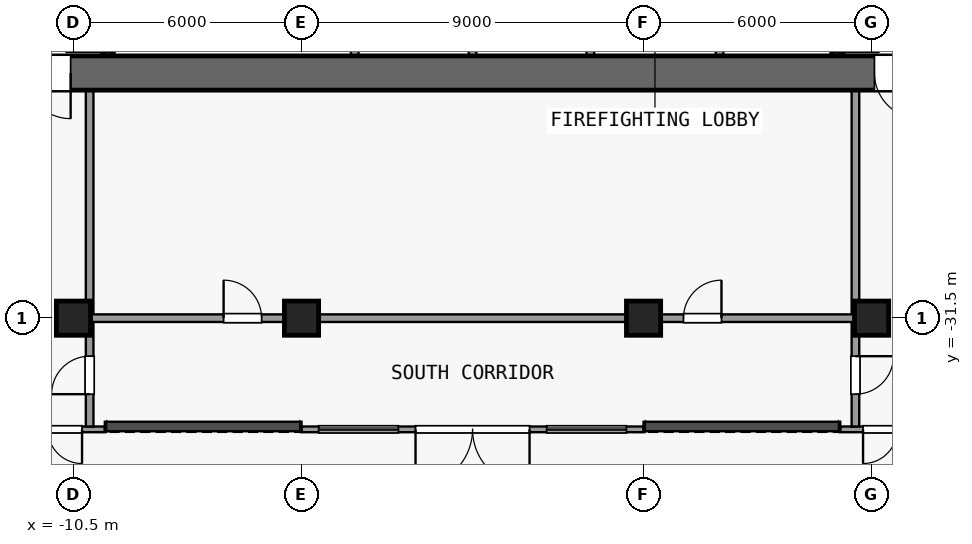
"""IFC4 building model, lengths in metres.
Left out: names, types, materials, properties, quantities, classifications, styles, units other than length and angle.
Written with IfcOpenShell. Run it as: python <this file> out.ifc"""

import sys

from ifc_helpers import new_model, si_unit, direction, frame, frame_2d, origin, origin_2d, place, context, subcontext, project, spatial, rectangle, extrude, element, fill, save


model = new_model("IFC4")
c1 = context("Model", 3, precision=1e-05, world=origin(), true_north=direction((0.0, 1.0)))
c2 = subcontext(c1, "Body", "Model", "MODEL_VIEW")
j1 = project(units=[si_unit("LENGTHUNIT", "METRE"), si_unit("PLANEANGLEUNIT", "RADIAN")], contexts=[c1])
p1 = place(None, origin())
s1 = spatial("IfcSite", under=j1, at=p1, CompositionType="ELEMENT")
p2 = place(p1, origin())
s2 = spatial("IfcBuilding", under=s1, at=p2, CompositionType="ELEMENT")
p3 = place(p2, origin())
s3 = spatial("IfcBuildingStorey", under=s2, at=p3, CompositionType="ELEMENT", Elevation=0.0)
for number, where, z_axis, x_axis in (
    (1, (-10.5, -31.5, 0.0), (0.0, 0.0, 1.0), (1.0, 0.0, 0.0)),
    (2, (-4.5, -31.5, 0.0), (0.0, 0.0, 1.0), (1.0, 0.0, 0.0)),
    (3, (4.5, -31.5, 0.0), (0.0, 0.0, 1.0), (1.0, 0.0, 0.0)),
    (4, (10.5, -31.5, 0.0), (0.0, 0.0, 1.0), (1.0, 0.0, 0.0)),
):
    element("IfcColumn", number, at=place(p3, frame(where, z_axis=z_axis, x_axis=x_axis)), inside=s3, PredefinedType="COLUMN", context=c2, shape_type="SweptSolid", body=[
        extrude(rectangle(XDim=0.9, YDim=0.9, at=origin_2d()), origin(), (0.0, 0.0, 1.0), 8.0),
    ])
p4 = place(p3, frame((13.5, -25.05, 0.0), z_axis=(0.0, 0.0, 1.0), x_axis=(-1.0, 0.0, 0.0)))
e5 = element("IfcWall", 5, at=p4, inside=s3, PredefinedType="SHEAR", context=c2, shape_type="SweptSolid", body=[
    extrude(rectangle(XDim=27.0, YDim=0.9, at=frame_2d((13.5, 0.0))), origin(), (0.0, 0.0, 1.0), 7.65),
])
p5 = place(p4, frame((24.075, 0.0, 0.0)))
e6 = element("IfcOpeningElement", 6, at=p5, cuts=e5, PredefinedType="OPENING", context=c2, shape_type="SweptSolid", body=[
    extrude(rectangle(XDim=1.2, YDim=2.1, at=frame_2d((0.6, 1.05))), frame((0.0, 0.46, 0.0), z_axis=(0.0, -1.0, 0.0), x_axis=(1.0, 0.0, 0.0)), (0.0, 0.0, 1.0), 0.92),
])
p6 = place(p4, frame((1.725, 0.0, 0.0)))
e7 = element("IfcOpeningElement", 7, at=p6, cuts=e5, PredefinedType="OPENING", context=c2, shape_type="SweptSolid", body=[
    extrude(rectangle(XDim=1.2, YDim=2.1, at=frame_2d((0.6, 1.05))), frame((0.0, 0.46, 0.0), z_axis=(0.0, -1.0, 0.0), x_axis=(1.0, 0.0, 0.0)), (0.0, 0.0, 1.0), 0.92),
])
p7 = place(p3, frame((-9.6, -24.6, 0.0), z_axis=(0.0, 0.0, 1.0), x_axis=(0.0, 1.0, 0.0)))
e8 = element("IfcWall", 8, at=p7, inside=s3, PredefinedType="SHEAR", context=c2, shape_type="SweptSolid", body=[
    extrude(rectangle(XDim=7.7, YDim=0.3, at=frame_2d((3.85, 0.0))), origin(), (0.0, 0.0, 1.0), 7.65),
])
p8 = place(p7, frame((0.1, 0.0, 0.0)))
e9 = element("IfcOpeningElement", 9, at=p8, cuts=e8, PredefinedType="OPENING", context=c2, shape_type="SweptSolid", body=[
    extrude(rectangle(XDim=1.1, YDim=2.1, at=frame_2d((0.55, 1.05))), frame((0.0, 0.16, 0.0), z_axis=(0.0, -1.0, 0.0), x_axis=(1.0, 0.0, 0.0)), (0.0, 0.0, 1.0), 0.32),
])
p9 = place(p3, frame((-3.1, -22.55, 0.0), z_axis=(0.0, 0.0, 1.0), x_axis=(0.0, -1.0, 0.0)))
e10 = element("IfcWall", 10, at=p9, inside=s3, PredefinedType="PARTITIONING", context=c2, shape_type="SweptSolid", body=[
    extrude(rectangle(XDim=2.05, YDim=0.2, at=frame_2d((1.025, 0.0))), origin(), (0.0, 0.0, 1.0), 7.65),
])
p10 = place(p9, frame((0.5, 0.0, 0.0)))
e11 = element("IfcOpeningElement", 11, at=p10, cuts=e10, PredefinedType="OPENING", context=c2, shape_type="SweptSolid", body=[
    extrude(rectangle(XDim=0.9, YDim=2.1, at=frame_2d((0.45, 1.05))), frame((0.0, 0.11, 0.0), z_axis=(0.0, -1.0, 0.0), x_axis=(1.0, 0.0, 0.0)), (0.0, 0.0, 1.0), 0.22),
])
p11 = place(p3, frame((0.0, -24.6, 0.0), z_axis=(0.0, 0.0, 1.0), x_axis=(0.0, 1.0, 0.0)))
e12 = element("IfcWall", 12, at=p11, inside=s3, PredefinedType="PARTITIONING", context=c2, shape_type="SweptSolid", body=[
    extrude(rectangle(XDim=2.05, YDim=0.2, at=frame_2d((1.025, 0.0))), origin(), (0.0, 0.0, 1.0), 7.65),
])
p12 = place(p3, frame((3.1, -24.6, 0.0), z_axis=(0.0, 0.0, 1.0), x_axis=(0.0, 1.0, 0.0)))
e13 = element("IfcWall", 13, at=p12, inside=s3, PredefinedType="PARTITIONING", context=c2, shape_type="SweptSolid", body=[
    extrude(rectangle(XDim=2.05, YDim=0.2, at=frame_2d((1.025, 0.0))), origin(), (0.0, 0.0, 1.0), 7.65),
])
p13 = place(p12, frame((0.65, 0.0, 0.0)))
e14 = element("IfcOpeningElement", 14, at=p13, cuts=e13, PredefinedType="OPENING", context=c2, shape_type="SweptSolid", body=[
    extrude(rectangle(XDim=0.9, YDim=2.1, at=frame_2d((0.45, 1.05))), frame((0.0, 0.11, 0.0), z_axis=(0.0, -1.0, 0.0), x_axis=(1.0, 0.0, 0.0)), (0.0, 0.0, 1.0), 0.22),
])
p14 = place(p3, frame((6.5, -22.55, 0.0), z_axis=(0.0, 0.0, 1.0), x_axis=(0.0, -1.0, 0.0)))
e15 = element("IfcWall", 15, at=p14, inside=s3, PredefinedType="PARTITIONING", context=c2, shape_type="SweptSolid", body=[
    extrude(rectangle(XDim=2.05, YDim=0.2, at=frame_2d((1.025, 0.0))), origin(), (0.0, 0.0, 1.0), 7.65),
])
p15 = place(p14, frame((0.35, 0.0, 0.0)))
e16 = element("IfcOpeningElement", 16, at=p15, cuts=e15, PredefinedType="OPENING", context=c2, shape_type="SweptSolid", body=[
    extrude(rectangle(XDim=1.2, YDim=2.1, at=frame_2d((0.6, 1.05))), frame((0.0, 0.11, 0.0), z_axis=(0.0, -1.0, 0.0), x_axis=(1.0, 0.0, 0.0)), (0.0, 0.0, 1.0), 0.22),
])
p16 = place(p3, frame((9.6, -16.9, 0.0), z_axis=(0.0, 0.0, 1.0), x_axis=(0.0, -1.0, 0.0)))
e17 = element("IfcWall", 17, at=p16, inside=s3, PredefinedType="SHEAR", context=c2, shape_type="SweptSolid", body=[
    extrude(rectangle(XDim=7.7, YDim=0.3, at=frame_2d((3.85, 0.0))), origin(), (0.0, 0.0, 1.0), 7.65),
])
p17 = place(p16, frame((6.5, 0.0, 0.0)))
e18 = element("IfcOpeningElement", 18, at=p17, cuts=e17, PredefinedType="OPENING", context=c2, shape_type="SweptSolid", body=[
    extrude(rectangle(XDim=1.1, YDim=2.1, at=frame_2d((0.55, 1.05))), frame((0.0, 0.16, 0.0), z_axis=(0.0, -1.0, 0.0), x_axis=(1.0, 0.0, 0.0)), (0.0, 0.0, 1.0), 0.32),
])
p18 = place(p3, frame((-10.075, -34.35, 0.0), z_axis=(0.0, 0.0, 1.0), x_axis=(0.0, 1.0, 0.0)))
e19 = element("IfcWall", 19, at=p18, inside=s3, PredefinedType="PARTITIONING", context=c2, shape_type="SweptSolid", body=[
    extrude(rectangle(XDim=8.85, YDim=0.2, at=frame_2d((4.425, 0.0))), origin(), (0.0, 0.0, 1.0), 7.65),
])
p19 = place(p18, frame((0.85, 0.0, 0.0)))
e20 = element("IfcOpeningElement", 20, at=p19, cuts=e19, PredefinedType="OPENING", context=c2, shape_type="SweptSolid", body=[
    extrude(rectangle(XDim=1.0, YDim=2.1, at=frame_2d((0.5, 1.05))), frame((0.0, 0.11, 0.0), z_axis=(0.0, -1.0, 0.0), x_axis=(1.0, 0.0, 0.0)), (0.0, 0.0, 1.0), 0.22),
])
p20 = place(p3, frame((10.075, -25.5, 0.0), z_axis=(0.0, 0.0, 1.0), x_axis=(0.0, -1.0, 0.0)))
e21 = element("IfcWall", 21, at=p20, inside=s3, PredefinedType="PARTITIONING", context=c2, shape_type="SweptSolid", body=[
    extrude(rectangle(XDim=8.85, YDim=0.2, at=frame_2d((4.425, 0.0))), origin(), (0.0, 0.0, 1.0), 7.65),
])
p21 = place(p20, frame((7.0, 0.0, 0.0)))
e22 = element("IfcOpeningElement", 22, at=p21, cuts=e21, PredefinedType="OPENING", context=c2, shape_type="SweptSolid", body=[
    extrude(rectangle(XDim=1.0, YDim=2.1, at=frame_2d((0.5, 1.05))), frame((0.0, 0.11, 0.0), z_axis=(0.0, -1.0, 0.0), x_axis=(1.0, 0.0, 0.0)), (0.0, 0.0, 1.0), 0.22),
])
p22 = place(p3, frame((4.5, -34.425, 0.0), z_axis=(0.0, 0.0, 1.0), x_axis=(-1.0, 0.0, 0.0)))
e23 = element("IfcWall", 23, at=p22, inside=s3, PredefinedType="SOLIDWALL", context=c2, shape_type="SweptSolid", body=[
    extrude(rectangle(XDim=9.0, YDim=0.15, at=frame_2d((4.5, 0.0))), origin(), (0.0, 0.0, 1.0), 7.65),
])
p23 = place(p22, frame((3.0, 0.0, 0.0)))
e24 = element("IfcOpeningElement", 24, at=p23, cuts=e23, PredefinedType="OPENING", context=c2, shape_type="SweptSolid", body=[
    extrude(rectangle(XDim=3.0, YDim=3.6, at=frame_2d((1.5, 1.8))), frame((0.0, 0.085, 0.0), z_axis=(0.0, -1.0, 0.0), x_axis=(1.0, 0.0, 0.0)), (0.0, 0.0, 1.0), 0.17),
])
p24 = place(p22, frame((6.45, 0.0, 0.0)))
e25 = element("IfcOpeningElement", 25, at=p24, cuts=e23, PredefinedType="OPENING", context=c2, shape_type="SweptSolid", body=[
    extrude(rectangle(XDim=2.1, YDim=5.0, at=frame_2d((1.05, 2.5))), frame((0.0, 0.085, 0.0), z_axis=(0.0, -1.0, 0.0), x_axis=(1.0, 0.0, 0.0)), (0.0, 0.0, 1.0), 0.17),
])
p25 = place(p22, frame((0.45, 0.0, 0.0)))
e26 = element("IfcOpeningElement", 26, at=p25, cuts=e23, PredefinedType="OPENING", context=c2, shape_type="SweptSolid", body=[
    extrude(rectangle(XDim=2.1, YDim=5.0, at=frame_2d((1.05, 2.5))), frame((0.0, 0.085, 0.0), z_axis=(0.0, -1.0, 0.0), x_axis=(1.0, 0.0, 0.0)), (0.0, 0.0, 1.0), 0.17),
])
p26 = place(p3, frame((-9.675, -34.425, 0.0), z_axis=(0.0, 0.0, 1.0), x_axis=(-1.0, 0.0, 0.0)))
e27 = element("IfcWall", 27, at=p26, inside=s3, PredefinedType="SOLIDWALL", context=c2, shape_type="SweptSolid", body=[
    extrude(rectangle(XDim=3.0, YDim=0.15, at=frame_2d((1.5, 0.0))), origin(), (0.0, 0.0, 1.0), 7.65),
])
p27 = place(p26, frame((0.6, 0.0, 0.0)))
e28 = element("IfcOpeningElement", 28, at=p27, cuts=e27, PredefinedType="OPENING", context=c2, shape_type="SweptSolid", body=[
    extrude(rectangle(XDim=1.8, YDim=2.1, at=frame_2d((0.9, 1.05))), frame((0.0, 0.085, 0.0), z_axis=(0.0, -1.0, 0.0), x_axis=(1.0, 0.0, 0.0)), (0.0, 0.0, 1.0), 0.17),
])
p28 = place(p3, frame((12.675, -34.425, 0.0), z_axis=(0.0, 0.0, 1.0), x_axis=(-1.0, 0.0, 0.0)))
e29 = element("IfcWall", 29, at=p28, inside=s3, PredefinedType="SOLIDWALL", context=c2, shape_type="SweptSolid", body=[
    extrude(rectangle(XDim=3.0, YDim=0.15, at=frame_2d((1.5, 0.0))), origin(), (0.0, 0.0, 1.0), 7.65),
])
p29 = place(p28, frame((0.6, 0.0, 0.0)))
e30 = element("IfcOpeningElement", 30, at=p29, cuts=e29, PredefinedType="OPENING", context=c2, shape_type="SweptSolid", body=[
    extrude(rectangle(XDim=1.8, YDim=2.1, at=frame_2d((0.9, 1.05))), frame((0.0, 0.085, 0.0), z_axis=(0.0, -1.0, 0.0), x_axis=(1.0, 0.0, 0.0)), (0.0, 0.0, 1.0), 0.17),
])
p30 = place(p3, frame((-10.05, -31.5, 0.0), z_axis=(0.0, 0.0, 1.0), x_axis=(1.0, 0.0, 0.0)))
e31 = element("IfcWall", 31, at=p30, inside=s3, PredefinedType="PARTITIONING", context=c2, shape_type="SweptSolid", body=[
    extrude(rectangle(XDim=20.1, YDim=0.2, at=frame_2d((10.05, 0.0))), origin(), (0.0, 0.0, 1.0), 7.65),
])
p31 = place(p30, frame((3.5, 0.0, 0.0)))
e32 = element("IfcOpeningElement", 32, at=p31, cuts=e31, PredefinedType="OPENING", context=c2, shape_type="SweptSolid", body=[
    extrude(rectangle(XDim=1.0, YDim=2.1, at=frame_2d((0.5, 1.05))), frame((0.0, 0.11, 0.0), z_axis=(0.0, -1.0, 0.0), x_axis=(1.0, 0.0, 0.0)), (0.0, 0.0, 1.0), 0.22),
])
p32 = place(p30, frame((15.6, 0.0, 0.0)))
e33 = element("IfcOpeningElement", 33, at=p32, cuts=e31, PredefinedType="OPENING", context=c2, shape_type="SweptSolid", body=[
    extrude(rectangle(XDim=1.0, YDim=2.1, at=frame_2d((0.5, 1.05))), frame((0.0, 0.11, 0.0), z_axis=(0.0, -1.0, 0.0), x_axis=(1.0, 0.0, 0.0)), (0.0, 0.0, 1.0), 0.22),
])
p33 = place(p5, origin())
e34 = element("IfcDoor", 34, at=p33, inside=s3, OperationType="SINGLE_SWING_LEFT", PredefinedType="DOOR", context=c2, shape_type="SweptSolid", body=[
    extrude(rectangle(XDim=1.2, YDim=2.1, at=frame_2d((0.6, 1.05))), frame((0.0, 0.025, 0.0), z_axis=(0.0, -1.0, 0.0), x_axis=(1.0, 0.0, 0.0)), (0.0, 0.0, 1.0), 0.05),
])
fill(e6, e34)
p34 = place(p6, origin())
e35 = element("IfcDoor", 35, at=p34, inside=s3, OperationType="SINGLE_SWING_LEFT", PredefinedType="DOOR", context=c2, shape_type="SweptSolid", body=[
    extrude(rectangle(XDim=1.2, YDim=2.1, at=frame_2d((0.6, 1.05))), frame((0.0, 0.025, 0.0), z_axis=(0.0, -1.0, 0.0), x_axis=(1.0, 0.0, 0.0)), (0.0, 0.0, 1.0), 0.05),
])
fill(e7, e35)
p35 = place(p19, origin())
e36 = element("IfcDoor", 36, at=p35, inside=s3, OperationType="SINGLE_SWING_LEFT", PredefinedType="DOOR", context=c2, shape_type="SweptSolid", body=[
    extrude(rectangle(XDim=1.0, YDim=2.1, at=frame_2d((0.5, 1.05))), frame((0.0, 0.025, 0.0), z_axis=(0.0, -1.0, 0.0), x_axis=(1.0, 0.0, 0.0)), (0.0, 0.0, 1.0), 0.05),
])
fill(e20, e36)
p36 = place(p21, origin())
e37 = element("IfcDoor", 37, at=p36, inside=s3, OperationType="SINGLE_SWING_LEFT", PredefinedType="DOOR", context=c2, shape_type="SweptSolid", body=[
    extrude(rectangle(XDim=1.0, YDim=2.1, at=frame_2d((0.5, 1.05))), frame((0.0, 0.025, 0.0), z_axis=(0.0, -1.0, 0.0), x_axis=(1.0, 0.0, 0.0)), (0.0, 0.0, 1.0), 0.05),
])
fill(e22, e37)
p37 = place(p23, origin())
e38 = element("IfcDoor", 38, at=p37, inside=s3, OperationType="DOUBLE_DOOR_SINGLE_SWING", PredefinedType="DOOR", context=c2, shape_type="SweptSolid", body=[
    extrude(rectangle(XDim=3.0, YDim=3.6, at=frame_2d((1.5, 1.8))), frame((0.0, 0.025, 0.0), z_axis=(0.0, -1.0, 0.0), x_axis=(1.0, 0.0, 0.0)), (0.0, 0.0, 1.0), 0.05),
])
fill(e24, e38)
p38 = place(p24, origin())
e39 = element("IfcWindow", 39, at=p38, inside=s3, PartitioningType="SINGLE_PANEL", PredefinedType="WINDOW", context=c2, shape_type="SweptSolid", body=[
    extrude(rectangle(XDim=2.1, YDim=5.0, at=frame_2d((1.05, 2.5))), frame((0.0, 0.03, 0.0), z_axis=(0.0, -1.0, 0.0), x_axis=(1.0, 0.0, 0.0)), (0.0, 0.0, 1.0), 0.06),
])
fill(e25, e39)
p39 = place(p25, origin())
e40 = element("IfcWindow", 40, at=p39, inside=s3, PartitioningType="SINGLE_PANEL", PredefinedType="WINDOW", context=c2, shape_type="SweptSolid", body=[
    extrude(rectangle(XDim=2.1, YDim=5.0, at=frame_2d((1.05, 2.5))), frame((0.0, 0.03, 0.0), z_axis=(0.0, -1.0, 0.0), x_axis=(1.0, 0.0, 0.0)), (0.0, 0.0, 1.0), 0.06),
])
fill(e26, e40)
p40 = place(p27, origin())
e41 = element("IfcDoor", 41, at=p40, inside=s3, OperationType="DOUBLE_DOOR_SINGLE_SWING", PredefinedType="DOOR", context=c2, shape_type="SweptSolid", body=[
    extrude(rectangle(XDim=1.8, YDim=2.1, at=frame_2d((0.9, 1.05))), frame((0.0, 0.025, 0.0), z_axis=(0.0, -1.0, 0.0), x_axis=(1.0, 0.0, 0.0)), (0.0, 0.0, 1.0), 0.05),
])
fill(e28, e41)
p41 = place(p29, origin())
e42 = element("IfcDoor", 42, at=p41, inside=s3, OperationType="DOUBLE_DOOR_SINGLE_SWING", PredefinedType="DOOR", context=c2, shape_type="SweptSolid", body=[
    extrude(rectangle(XDim=1.8, YDim=2.1, at=frame_2d((0.9, 1.05))), frame((0.0, 0.025, 0.0), z_axis=(0.0, -1.0, 0.0), x_axis=(1.0, 0.0, 0.0)), (0.0, 0.0, 1.0), 0.05),
])
fill(e30, e42)
p42 = place(p31, origin())
e43 = element("IfcDoor", 43, at=p42, inside=s3, OperationType="SINGLE_SWING_RIGHT", PredefinedType="DOOR", context=c2, shape_type="SweptSolid", body=[
    extrude(rectangle(XDim=1.0, YDim=2.1, at=frame_2d((0.5, 1.05))), frame((0.0, 0.025, 0.0), z_axis=(0.0, -1.0, 0.0), x_axis=(1.0, 0.0, 0.0)), (0.0, 0.0, 1.0), 0.05),
])
fill(e32, e43)
p43 = place(p32, origin())
e44 = element("IfcDoor", 44, at=p43, inside=s3, OperationType="SINGLE_SWING_LEFT", PredefinedType="DOOR", context=c2, shape_type="SweptSolid", body=[
    extrude(rectangle(XDim=1.0, YDim=2.1, at=frame_2d((0.5, 1.05))), frame((0.0, 0.025, 0.0), z_axis=(0.0, -1.0, 0.0), x_axis=(1.0, 0.0, 0.0)), (0.0, 0.0, 1.0), 0.05),
])
fill(e33, e44)
save(model, sys.argv[1])
